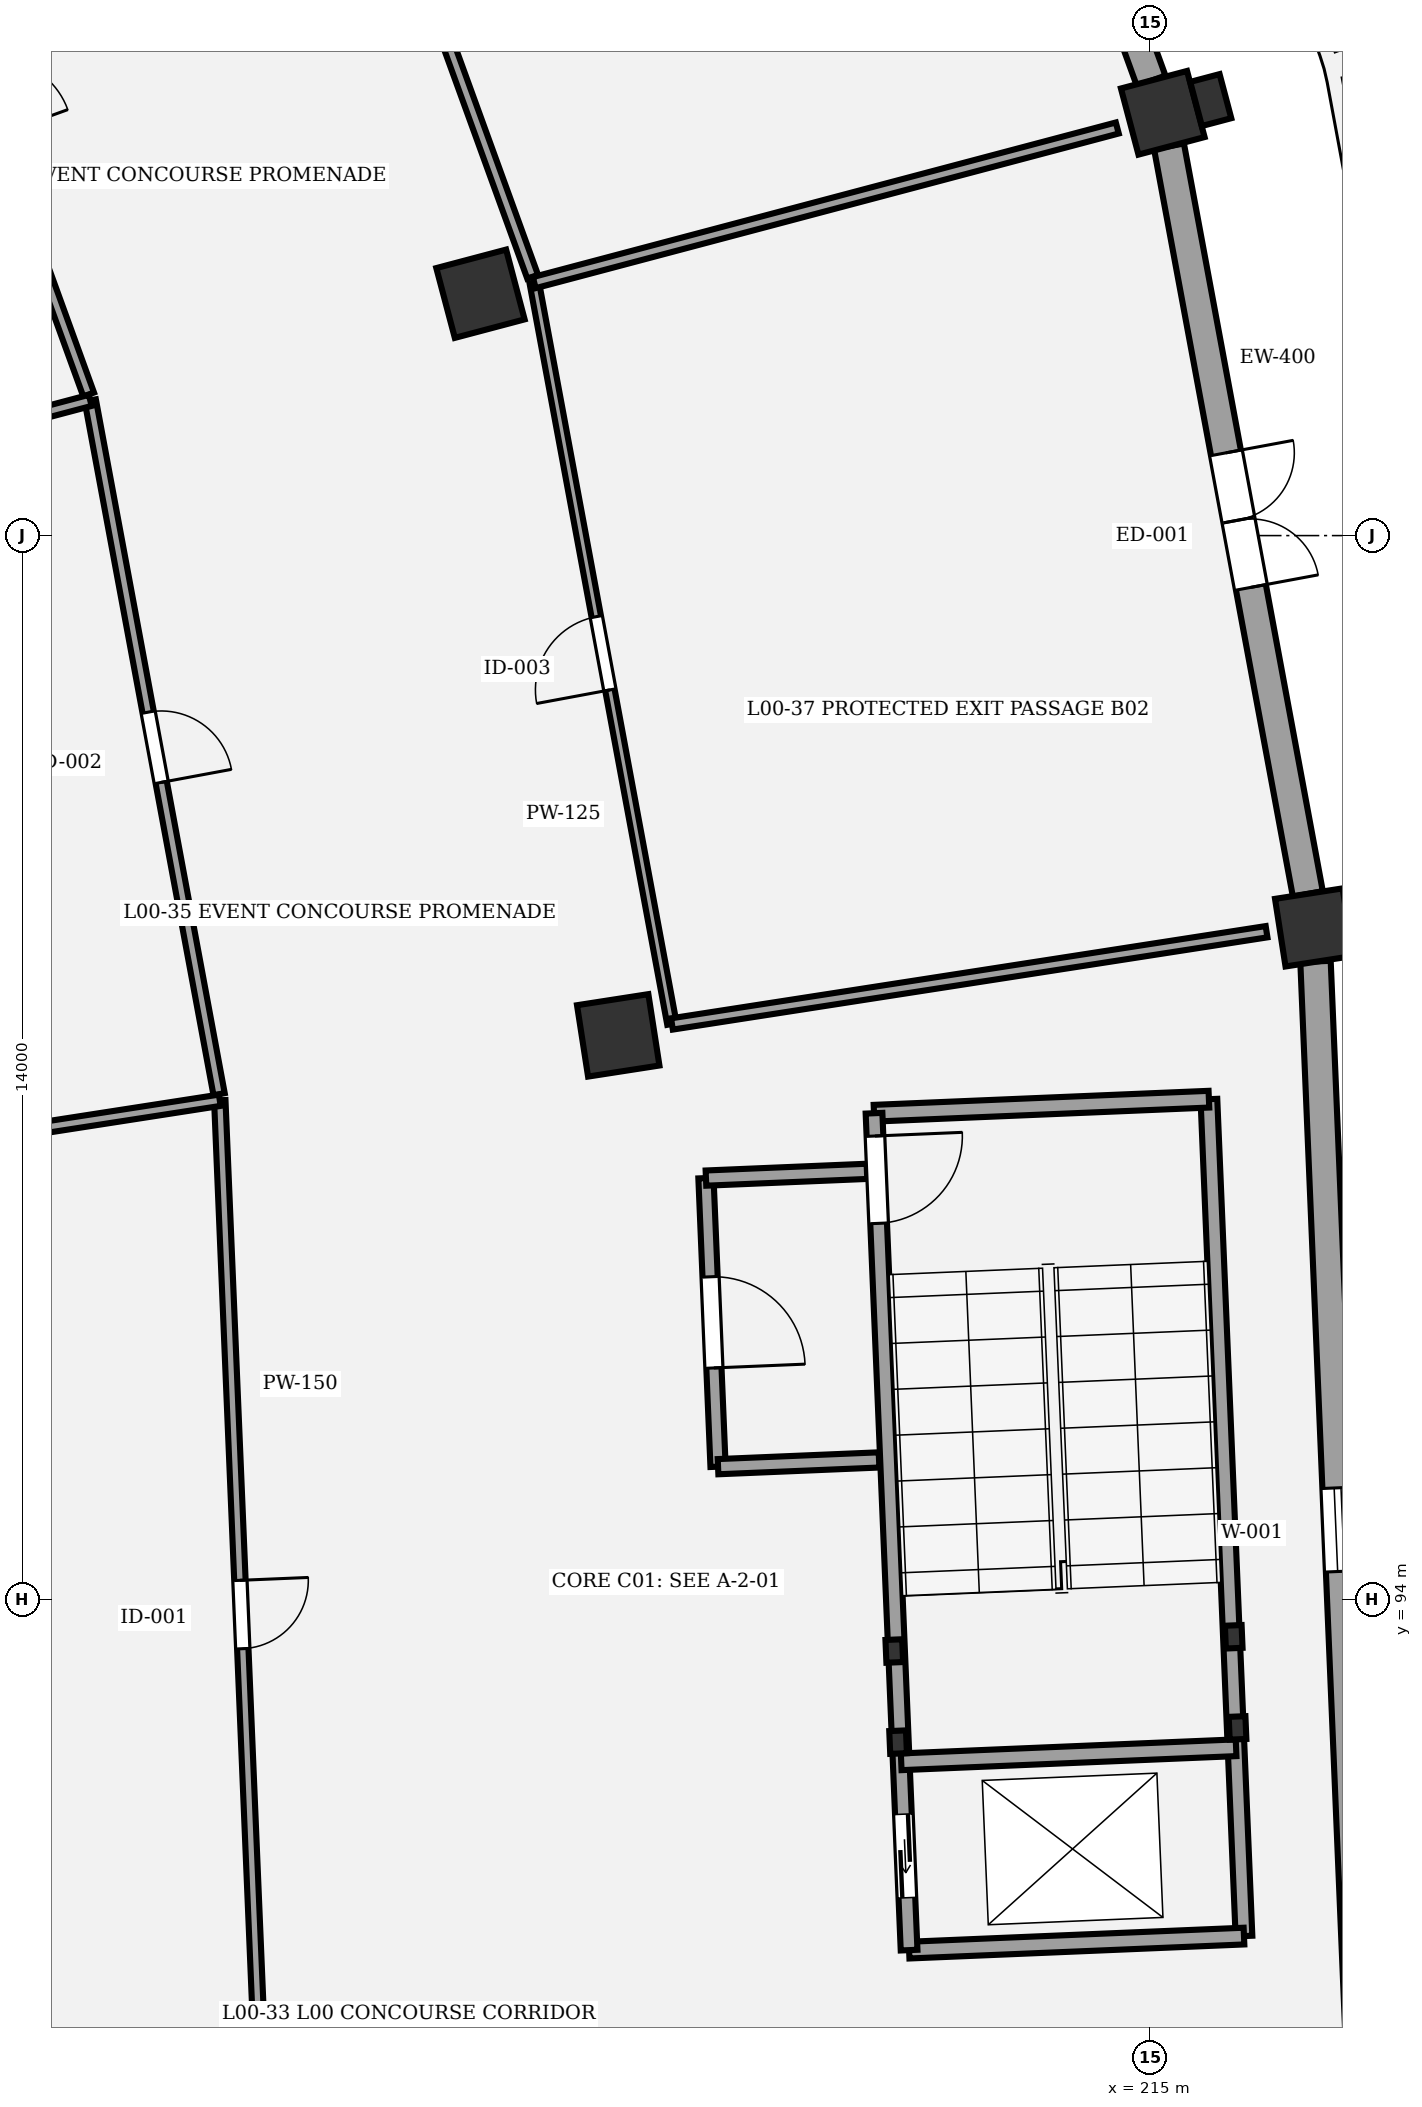
"""IFC4 building model, lengths in metres.
Left out: names, types, materials, properties, quantities, classifications, styles, units other than length and angle.
Written with IfcOpenShell. Run it as: python <this file> out.ifc"""

import sys

from ifc_helpers import new_model, si_unit, direction, frame, frame_2d, origin, origin_2d, place, context, subcontext, project, spatial, rectangle, extrude, element, fill, save


model = new_model("IFC4")
c1 = context("Model", 3, precision=1e-05, world=origin(), true_north=direction((0.0, 1.0)))
c2 = subcontext(c1, "Body", "Model", "MODEL_VIEW")
j1 = project(units=[si_unit("LENGTHUNIT", "METRE"), si_unit("PLANEANGLEUNIT", "RADIAN")], contexts=[c1])
p1 = place(None, origin())
s1 = spatial("IfcSite", under=j1, at=p1, CompositionType="ELEMENT")
p2 = place(p1, origin())
s2 = spatial("IfcBuilding", under=s1, at=p2, CompositionType="ELEMENT")
p3 = place(p2, origin())
s3 = spatial("IfcBuildingStorey", under=s2, at=p3, CompositionType="ELEMENT", Elevation=0.0)
p4 = place(p3, frame((208.0, 101.425, 0.0), z_axis=(0.0, 0.0, 1.0), x_axis=(0.98817491911, 0.153330783737, 0.0)))
e1 = element("IfcColumn", 1, at=p4, inside=s3, PredefinedType="COLUMN", context=c2, shape_type="SweptSolid", body=[
    extrude(rectangle(XDim=0.95, YDim=0.95, at=origin_2d()), origin(), (0.0, 0.0, 1.0), 5.4),
])
p5 = place(p3, frame((217.156, 102.845, 0.0), z_axis=(0.0, 0.0, 1.0), x_axis=(0.98817491911, 0.153330783737, 0.0)))
e2 = element("IfcColumn", 2, at=p5, inside=s3, PredefinedType="COLUMN", context=c2, shape_type="SweptSolid", body=[
    extrude(rectangle(XDim=0.9, YDim=0.9, at=origin_2d()), origin(), (0.0, 0.0, 1.0), 5.4),
])
p6 = place(p3, frame((206.188, 111.182, 0.0), z_axis=(0.0, 0.0, 1.0), x_axis=(0.966600102017, 0.256289373133, 0.0)))
e3 = element("IfcColumn", 3, at=p6, inside=s3, PredefinedType="COLUMN", context=c2, shape_type="SweptSolid", body=[
    extrude(rectangle(XDim=0.95, YDim=0.95, at=origin_2d()), origin(), (0.0, 0.0, 1.0), 5.4),
])
p7 = place(p3, frame((215.165, 113.562, 0.0), z_axis=(0.0, 0.0, 1.0), x_axis=(0.966600102017, 0.256289373133, 0.0)))
e4 = element("IfcColumn", 4, at=p7, inside=s3, PredefinedType="COLUMN", context=c2, shape_type="SweptSolid", body=[
    extrude(rectangle(XDim=0.9, YDim=0.9, at=origin_2d()), origin(), (0.0, 0.0, 1.0), 5.4),
])
p8 = place(p3, frame((215.796, 113.73, 0.0), z_axis=(0.0, 0.0, 1.0), x_axis=(-0.256289373133, 0.966600102017, 0.0)))
e5 = element("IfcColumn", 5, at=p8, inside=s3, PredefinedType="PILASTER", context=c2, shape_type="SweptSolid", body=[
    extrude(rectangle(XDim=0.6, YDim=0.4, at=origin_2d()), origin(), (0.0, 0.0, 1.0), 5.4),
])
p9 = place(p3, frame((217.174, 102.397, 0.0), z_axis=(0.0, 0.0, 1.0), x_axis=(0.041899972393, -0.999121810548, 0.0)))
e6 = element("IfcWall", 6, at=p9, inside=s3, PredefinedType="STANDARD", context=c2, shape_type="SweptSolid", body=[
    extrude(rectangle(XDim=14.963, YDim=0.4, at=frame_2d((7.481, 0.0))), origin(), (0.0, 0.0, 1.0), 4.25),
])
p10 = place(p9, frame((6.931, 0.0, 1.1)))
e7 = element("IfcOpeningElement", 7, at=p10, cuts=e6, PredefinedType="OPENING", context=c2, shape_type="SweptSolid", body=[
    extrude(rectangle(XDim=1.1, YDim=1.55, at=frame_2d((0.55, 0.775))), frame((0.0, 0.21, 0.0), z_axis=(0.0, -1.0, 0.0), x_axis=(1.0, 0.0, 0.0)), (0.0, 0.0, 1.0), 0.42),
])
p11 = place(p3, frame((215.246, 113.122, 0.0), z_axis=(0.0, 0.0, 1.0), x_axis=(0.182624880635, -0.98318266511, 0.0)))
e8 = element("IfcWall", 8, at=p11, inside=s3, PredefinedType="STANDARD", context=c2, shape_type="SweptSolid", body=[
    extrude(rectangle(XDim=10.005, YDim=0.4, at=frame_2d((5.002, 0.0))), origin(), (0.0, 0.0, 1.0), 4.25),
])
p12 = place(p11, frame((4.102, 0.0, 0.0)))
e9 = element("IfcOpeningElement", 9, at=p12, cuts=e8, PredefinedType="OPENING", context=c2, shape_type="SweptSolid", body=[
    extrude(rectangle(XDim=1.8, YDim=2.4, at=frame_2d((0.9, 1.2))), frame((0.0, 0.21, 0.0), z_axis=(0.0, -1.0, 0.0), x_axis=(1.0, 0.0, 0.0)), (0.0, 0.0, 1.0), 0.42),
])
p13 = place(p3, frame((212.009, 122.261, 0.0), z_axis=(0.0, 0.0, 1.0), x_axis=(0.341030587203, -0.940052199929, 0.0)))
e10 = element("IfcWall", 10, at=p13, inside=s3, PredefinedType="STANDARD", context=c2, shape_type="SweptSolid", body=[
    extrude(rectangle(XDim=8.805, YDim=0.4, at=frame_2d((4.403, 0.0))), origin(), (0.0, 0.0, 1.0), 4.25),
])
p14 = place(p13, frame((3.453, 0.0, 0.0)))
e11 = element("IfcOpeningElement", 11, at=p14, cuts=e10, PredefinedType="OPENING", context=c2, shape_type="SweptSolid", body=[
    extrude(rectangle(XDim=1.9, YDim=2.4, at=frame_2d((0.95, 1.2))), frame((0.0, 0.21, 0.0), z_axis=(0.0, -1.0, 0.0), x_axis=(1.0, 0.0, 0.0)), (0.0, 0.0, 1.0), 0.42),
])
for number, where, z_axis, x_axis in (
    (12, (211.632, 93.325, 0.0), (0.0, 0.0, 1.0), (0.042, -0.999, 0.0)),
    (13, (211.682, 92.126, 0.0), (0.0, 0.0, 1.0), (0.042, -0.999, 0.0)),
    (14, (216.148, 92.314, 0.0), (0.0, 0.0, 1.0), (0.042, -0.999, 0.0)),
    (15, (216.098, 93.513, 0.0), (0.0, 0.0, 1.0), (0.042, -0.999, 0.0)),
):
    element("IfcColumn", number, at=place(p3, frame(where, z_axis=z_axis, x_axis=x_axis)), inside=s3, PredefinedType="COLUMN", context=c2, shape_type="SweptSolid", body=[
        extrude(rectangle(XDim=0.3, YDim=0.22, at=origin_2d()), origin(), (0.0, 0.0, 1.0), 5.4),
    ])
p15 = place(p3, frame((215.772, 100.585, 0.0), z_axis=(0.0, 0.0, 1.0), x_axis=(0.041871977473, -0.999122984173, 0.0)))
e16 = element("IfcWall", 16, at=p15, inside=s3, PredefinedType="SHEAR", context=c2, shape_type="SweptSolid", body=[
    extrude(rectangle(XDim=11.02, YDim=0.22, at=frame_2d((5.51, 0.0))), origin(), (0.0, 0.0, 1.0), 5.15),
])
for number, where, z_axis, x_axis in (
    (17, (211.365, 100.4, 0.0), (0.0, 0.0, 1.0), (0.999, 0.042, 0.0)),
    (18, (211.827, 89.39, 0.0), (0.0, 0.0, 1.0), (0.999, 0.042, 0.0)),
):
    element("IfcWall", number, at=place(p3, frame(where, z_axis=z_axis, x_axis=x_axis)), inside=s3, PredefinedType="SHEAR", context=c2, shape_type="SweptSolid", body=[
        extrude(rectangle(XDim=4.41, YDim=0.22, at=frame_2d((2.205, 0.0))), origin(), (0.0, 0.0, 1.0), 5.15),
    ])
p16 = place(p3, frame((211.365, 100.4, 0.0), z_axis=(0.0, 0.0, 1.0), x_axis=(0.041871977473, -0.999122984173, 0.0)))
e19 = element("IfcWall", 19, at=p16, inside=s3, PredefinedType="SHEAR", context=c2, shape_type="SweptSolid", body=[
    extrude(rectangle(XDim=11.02, YDim=0.22, at=frame_2d((5.51, 0.0))), origin(), (0.0, 0.0, 1.0), 5.15),
])
p17 = place(p16, frame((0.3, 0.0, 0.0)))
e20 = element("IfcOpeningElement", 20, at=p17, cuts=e19, PredefinedType="OPENING", context=c2, shape_type="SweptSolid", body=[
    extrude(rectangle(XDim=1.15, YDim=2.15, at=frame_2d((0.575, 1.075))), frame((0.0, 0.12, 0.0), z_axis=(0.0, -1.0, 0.0), x_axis=(1.0, 0.0, 0.0)), (0.0, 0.0, 1.0), 0.24),
])
p18 = place(p16, frame((9.23, 0.0, 0.0)))
e21 = element("IfcOpeningElement", 21, at=p18, cuts=e19, PredefinedType="OPENING", context=c2, shape_type="SweptSolid", body=[
    extrude(rectangle(XDim=1.1, YDim=2.15, at=frame_2d((0.55, 1.075))), frame((0.0, 0.12, 0.0), z_axis=(0.0, -1.0, 0.0), x_axis=(1.0, 0.0, 0.0)), (0.0, 0.0, 1.0), 0.24),
])
p19 = place(p3, frame((211.723, 91.868, 0.0), z_axis=(0.0, 0.0, 1.0), x_axis=(0.999121521721, 0.041906859039, 0.0)))
e22 = element("IfcWall", 22, at=p19, inside=s3, PredefinedType="SHEAR", context=c2, shape_type="SweptSolid", body=[
    extrude(rectangle(XDim=4.41, YDim=0.22, at=frame_2d((2.205, 0.0))), origin(), (0.0, 0.0, 1.0), 5.15),
])
p20 = place(p3, frame((209.154, 99.547, 0.0), z_axis=(0.0, 0.0, 1.0), x_axis=(0.041889762691, -0.999122238658, 0.0)))
e23 = element("IfcWall", 23, at=p20, inside=s3, PredefinedType="PARTITIONING", context=c2, shape_type="SweptSolid", body=[
    extrude(rectangle(XDim=3.8, YDim=0.2, at=frame_2d((1.9, 0.0))), origin(), (0.0, 0.0, 1.0), 4.25),
])
p21 = place(p20, frame((1.3, 0.0, 0.0)))
e24 = element("IfcOpeningElement", 24, at=p21, cuts=e23, PredefinedType="OPENING", context=c2, shape_type="SweptSolid", body=[
    extrude(rectangle(XDim=1.2, YDim=2.18, at=frame_2d((0.6, 1.09))), frame((0.0, 0.11, 0.0), z_axis=(0.0, -1.0, 0.0), x_axis=(1.0, 0.0, 0.0)), (0.0, 0.0, 1.0), 0.22),
])
for number, where, z_axis, x_axis in (
    (25, (209.154, 99.547, 0.0), (0.0, 0.0, 1.0), (0.999, 0.042, 0.0)),
    (26, (209.313, 95.75, 0.0), (0.0, 0.0, 1.0), (0.999, 0.042, 0.0)),
):
    element("IfcWall", number, at=place(p3, frame(where, z_axis=z_axis, x_axis=x_axis)), inside=s3, PredefinedType="PARTITIONING", context=c2, shape_type="SweptSolid", body=[
        extrude(rectangle(XDim=2.12, YDim=0.2, at=frame_2d((1.06, 0.0))), origin(), (0.0, 0.0, 1.0), 4.25),
    ])
p22 = place(p3, frame((202.758, 100.571, 0.0), z_axis=(0.0, 0.0, 1.0), x_axis=(0.041894479342, -0.999122040894, 0.0)))
e27 = element("IfcWall", 27, at=p22, inside=s3, PredefinedType="PARTITIONING", context=c2, shape_type="SweptSolid", body=[
    extrude(rectangle(XDim=13.543, YDim=0.15, at=frame_2d((6.771, 0.0))), origin(), (0.0, 0.0, 1.0), 4.15),
])
p23 = place(p22, frame((6.322, 0.0, 0.0)))
e28 = element("IfcOpeningElement", 28, at=p23, cuts=e27, PredefinedType="OPENING", context=c2, shape_type="SweptSolid", body=[
    extrude(rectangle(XDim=0.9, YDim=2.1, at=frame_2d((0.45, 1.05))), frame((0.0, 0.085, 0.0), z_axis=(0.0, -1.0, 0.0), x_axis=(1.0, 0.0, 0.0)), (0.0, 0.0, 1.0), 0.17),
])
p24 = place(p3, frame((201.053, 109.779, 0.0), z_axis=(0.0, 0.0, 1.0), x_axis=(0.182600545941, -0.983187184936, 0.0)))
e29 = element("IfcWall", 29, at=p24, inside=s3, PredefinedType="PARTITIONING", context=c2, shape_type="SweptSolid", body=[
    extrude(rectangle(XDim=9.284, YDim=0.15, at=frame_2d((4.642, 0.0))), origin(), (0.0, 0.0, 1.0), 4.15),
])
p25 = place(p24, frame((4.172, 0.0, 0.0)))
e30 = element("IfcOpeningElement", 30, at=p25, cuts=e29, PredefinedType="OPENING", context=c2, shape_type="SweptSolid", body=[
    extrude(rectangle(XDim=0.94, YDim=2.1, at=frame_2d((0.47, 1.05))), frame((0.0, 0.085, 0.0), z_axis=(0.0, -1.0, 0.0), x_axis=(1.0, 0.0, 0.0)), (0.0, 0.0, 1.0), 0.17),
])
p26 = place(p3, frame((208.707, 101.575, 0.0), z_axis=(0.0, 0.0, 1.0), x_axis=(-0.182618024057, 0.983183938686, 0.0)))
e31 = element("IfcWall", 31, at=p26, inside=s3, PredefinedType="PARTITIONING", context=c2, shape_type="SweptSolid", body=[
    extrude(rectangle(XDim=9.92, YDim=0.125, at=frame_2d((4.96, 0.0))), origin(), (0.0, 0.0, 1.0), 4.15),
])
p27 = place(p26, frame((4.47, 0.0, 0.0)))
e32 = element("IfcOpeningElement", 32, at=p27, cuts=e31, PredefinedType="OPENING", context=c2, shape_type="SweptSolid", body=[
    extrude(rectangle(XDim=0.98, YDim=2.1, at=frame_2d((0.49, 1.05))), frame((0.0, 0.073, 0.0), z_axis=(0.0, -1.0, 0.0), x_axis=(1.0, 0.0, 0.0)), (0.0, 0.0, 1.0), 0.145),
])
p28 = place(p3, frame((198.218, 117.615, 0.0), z_axis=(0.0, 0.0, 1.0), x_axis=(0.341044733968, -0.940047067669, 0.0)))
e33 = element("IfcWall", 33, at=p28, inside=s3, PredefinedType="PARTITIONING", context=c2, shape_type="SweptSolid", body=[
    extrude(rectangle(XDim=8.254, YDim=0.15, at=frame_2d((4.127, 0.0))), origin(), (0.0, 0.0, 1.0), 4.15),
])
p29 = place(p28, frame((3.617, 0.0, 0.0)))
e34 = element("IfcOpeningElement", 34, at=p29, cuts=e33, PredefinedType="OPENING", context=c2, shape_type="SweptSolid", body=[
    extrude(rectangle(XDim=1.02, YDim=2.1, at=frame_2d((0.51, 1.05))), frame((0.0, 0.085, 0.0), z_axis=(0.0, -1.0, 0.0), x_axis=(1.0, 0.0, 0.0)), (0.0, 0.0, 1.0), 0.17),
])
p30 = place(p3, frame((206.874, 111.405, 0.0), z_axis=(0.0, 0.0, 1.0), x_axis=(-0.341031741571, 0.940051781149, 0.0)))
e35 = element("IfcWall", 35, at=p30, inside=s3, PredefinedType="PARTITIONING", context=c2, shape_type="SweptSolid", body=[
    extrude(rectangle(XDim=8.82, YDim=0.15, at=frame_2d((4.41, 0.0))), origin(), (0.0, 0.0, 1.0), 4.15),
])
p31 = place(p30, frame((3.88, 0.0, 0.0)))
e36 = element("IfcOpeningElement", 36, at=p31, cuts=e35, PredefinedType="OPENING", context=c2, shape_type="SweptSolid", body=[
    extrude(rectangle(XDim=1.06, YDim=2.1, at=frame_2d((0.53, 1.05))), frame((0.0, 0.085, 0.0), z_axis=(0.0, -1.0, 0.0), x_axis=(1.0, 0.0, 0.0)), (0.0, 0.0, 1.0), 0.17),
])
p32 = place(p3, frame((186.839, 98.102, 0.0), z_axis=(0.0, 0.0, 1.0), x_axis=(0.988184353902, 0.153269966734, 0.0)))
e37 = element("IfcWall", 37, at=p32, inside=s3, PredefinedType="PARTITIONING", context=c2, shape_type="SweptSolid", body=[
    extrude(rectangle(XDim=16.109, YDim=0.15, at=frame_2d((8.054, 0.0))), origin(), (0.0, 0.0, 1.0), 4.15),
])
p33 = place(p3, frame((185.445, 105.64, 0.0), z_axis=(0.0, 0.0, 1.0), x_axis=(0.966587096108, 0.256338420135, 0.0)))
e38 = element("IfcWall", 38, at=p33, inside=s3, PredefinedType="PARTITIONING", context=c2, shape_type="SweptSolid", body=[
    extrude(rectangle(XDim=16.148, YDim=0.15, at=frame_2d((8.074, 0.0))), origin(), (0.0, 0.0, 1.0), 4.15),
])
p34 = place(p3, frame((206.895, 111.328, 0.0), z_axis=(0.0, 0.0, 1.0), x_axis=(0.966593450181, 0.25631445934, 0.0)))
e39 = element("IfcWall", 39, at=p34, inside=s3, PredefinedType="PARTITIONING", context=c2, shape_type="SweptSolid", body=[
    extrude(rectangle(XDim=7.936, YDim=0.15, at=frame_2d((3.968, 0.0))), origin(), (0.0, 0.0, 1.0), 4.15),
])
p35 = place(p3, frame((216.53, 102.789, 0.0), z_axis=(0.0, 0.0, 1.0), x_axis=(-0.988185582016, -0.153262048451, 0.0)))
e40 = element("IfcWall", 40, at=p35, inside=s3, PredefinedType="PARTITIONING", context=c2, shape_type="SweptSolid", body=[
    extrude(rectangle(XDim=7.917, YDim=0.15, at=frame_2d((3.958, 0.0))), origin(), (0.0, 0.0, 1.0), 4.15),
])
p36 = place(p10, origin())
e41 = element("IfcWindow", 41, at=p36, inside=s3, PartitioningType="SINGLE_PANEL", PredefinedType="WINDOW", context=c2, shape_type="SweptSolid", body=[
    extrude(rectangle(XDim=1.1, YDim=1.55, at=frame_2d((0.55, 0.775))), frame((0.0, 0.03, 0.0), z_axis=(0.0, -1.0, 0.0), x_axis=(1.0, 0.0, 0.0)), (0.0, 0.0, 1.0), 0.06),
])
fill(e7, e41)
p37 = place(p12, origin())
e42 = element("IfcDoor", 42, at=p37, inside=s3, OperationType="DOUBLE_DOOR_SINGLE_SWING", PredefinedType="DOOR", context=c2, shape_type="SweptSolid", body=[
    extrude(rectangle(XDim=1.8, YDim=2.4, at=frame_2d((0.9, 1.2))), frame((0.0, 0.025, 0.0), z_axis=(0.0, -1.0, 0.0), x_axis=(1.0, 0.0, 0.0)), (0.0, 0.0, 1.0), 0.05),
])
fill(e9, e42)
p38 = place(p17, origin())
e43 = element("IfcDoor", 43, at=p38, inside=s3, OperationType="SINGLE_SWING_LEFT", PredefinedType="DOOR", context=c2, shape_type="SweptSolid", body=[
    extrude(rectangle(XDim=1.15, YDim=2.15, at=frame_2d((0.575, 1.075))), frame((0.0, 0.025, 0.0), z_axis=(0.0, -1.0, 0.0), x_axis=(1.0, 0.0, 0.0)), (0.0, 0.0, 1.0), 0.05),
])
fill(e20, e43)
p39 = place(p18, origin())
e44 = element("IfcDoor", 44, at=p39, inside=s3, OperationType="DOUBLE_DOOR_SLIDING", PredefinedType="DOOR", context=c2, shape_type="SweptSolid", body=[
    extrude(rectangle(XDim=1.1, YDim=2.15, at=frame_2d((0.55, 1.075))), frame((0.0, 0.025, 0.0), z_axis=(0.0, -1.0, 0.0), x_axis=(1.0, 0.0, 0.0)), (0.0, 0.0, 1.0), 0.05),
])
fill(e21, e44)
p40 = place(p21, origin())
e45 = element("IfcDoor", 45, at=p40, inside=s3, OperationType="SINGLE_SWING_RIGHT", PredefinedType="DOOR", context=c2, shape_type="SweptSolid", body=[
    extrude(rectangle(XDim=1.2, YDim=2.18, at=frame_2d((0.6, 1.09))), frame((0.0, 0.025, 0.0), z_axis=(0.0, -1.0, 0.0), x_axis=(1.0, 0.0, 0.0)), (0.0, 0.0, 1.0), 0.05),
])
fill(e24, e45)
p41 = place(p23, origin())
e46 = element("IfcDoor", 46, at=p41, inside=s3, OperationType="SINGLE_SWING_LEFT", PredefinedType="DOOR", context=c2, shape_type="SweptSolid", body=[
    extrude(rectangle(XDim=0.9, YDim=2.1, at=frame_2d((0.45, 1.05))), frame((0.0, 0.025, 0.0), z_axis=(0.0, -1.0, 0.0), x_axis=(1.0, 0.0, 0.0)), (0.0, 0.0, 1.0), 0.05),
])
fill(e28, e46)
p42 = place(p25, origin())
e47 = element("IfcDoor", 47, at=p42, inside=s3, OperationType="SINGLE_SWING_RIGHT", PredefinedType="DOOR", context=c2, shape_type="SweptSolid", body=[
    extrude(rectangle(XDim=0.94, YDim=2.1, at=frame_2d((0.47, 1.05))), frame((0.0, 0.025, 0.0), z_axis=(0.0, -1.0, 0.0), x_axis=(1.0, 0.0, 0.0)), (0.0, 0.0, 1.0), 0.05),
])
fill(e30, e47)
p43 = place(p27, origin())
e48 = element("IfcDoor", 48, at=p43, inside=s3, OperationType="SINGLE_SWING_LEFT", PredefinedType="DOOR", context=c2, shape_type="SweptSolid", body=[
    extrude(rectangle(XDim=0.98, YDim=2.1, at=frame_2d((0.49, 1.05))), frame((0.0, 0.025, 0.0), z_axis=(0.0, -1.0, 0.0), x_axis=(1.0, 0.0, 0.0)), (0.0, 0.0, 1.0), 0.05),
])
fill(e32, e48)
save(model, sys.argv[1])
